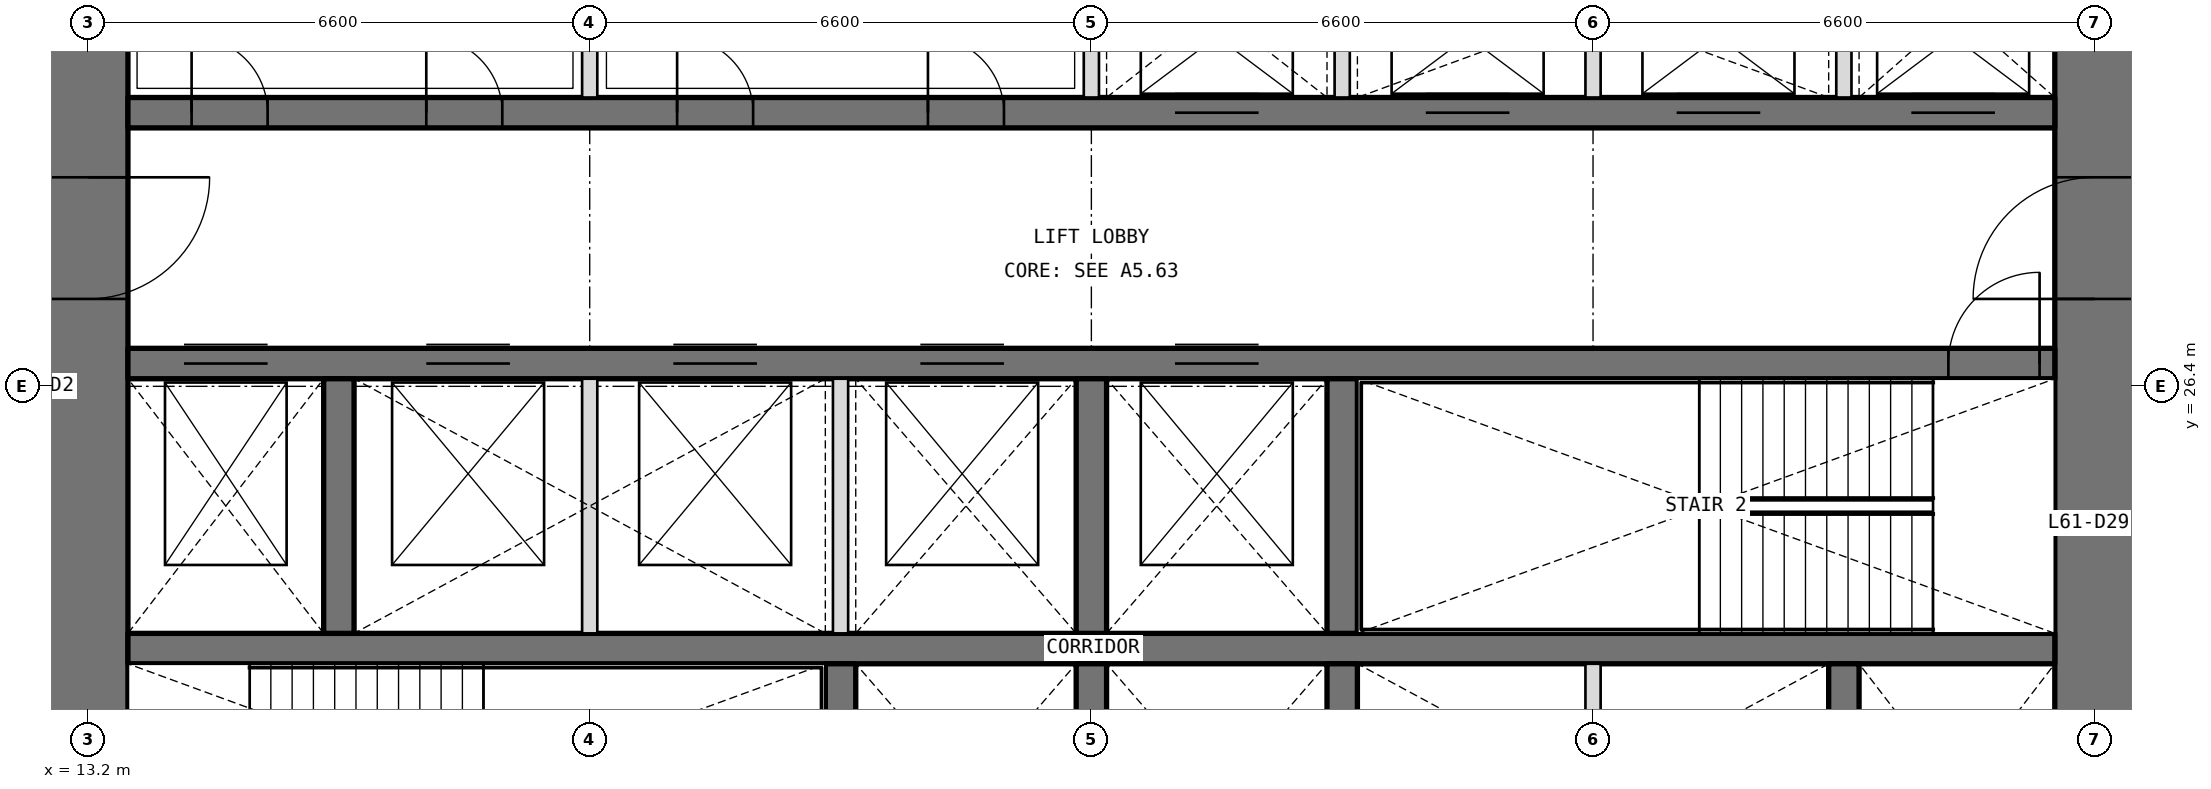
"""IFC4 building model, lengths in metres.
Left out: names, types, materials, properties, quantities, classifications, styles, units other than length and angle.
Written with IfcOpenShell. Run it as: python <this file> out.ifc"""

import sys

from ifc_helpers import new_model, si_unit, direction, frame, frame_2d, origin, place, context, subcontext, project, spatial, rectangle, extrude, element, fill, save


model = new_model("IFC4")
c1 = context("Model", 3, precision=1e-05, world=origin(), true_north=direction((0.0, 1.0)))
c2 = subcontext(c1, "Body", "Model", "MODEL_VIEW")
j1 = project(units=[si_unit("LENGTHUNIT", "METRE"), si_unit("PLANEANGLEUNIT", "RADIAN")], contexts=[c1])
p1 = place(None, origin())
s1 = spatial("IfcSite", under=j1, at=p1, CompositionType="ELEMENT")
p2 = place(p1, origin())
s2 = spatial("IfcBuilding", under=s1, at=p2, CompositionType="ELEMENT")
p3 = place(p2, frame((0.0, 0.0, 267.0)))
s3 = spatial("IfcBuildingStorey", under=s2, at=p3, CompositionType="ELEMENT", Elevation=267.0)
p4 = place(p3, frame((39.6, 13.725, 0.0), z_axis=(0.0, 0.0, 1.0), x_axis=(0.0, 1.0, 0.0)))
e1 = element("IfcWall", 1, at=p4, inside=s3, PredefinedType="SHEAR", context=c2, shape_type="SweptSolid", body=[
    extrude(rectangle(XDim=18.75, YDim=1.05, at=frame_2d((9.375, 0.0))), origin(), (0.0, 0.0, 1.0), 4.2),
])
p5 = place(p4, frame((3.025, 0.0, 0.0)))
e2 = element("IfcOpeningElement", 2, at=p5, cuts=e1, PredefinedType="OPENING", context=c2, shape_type="SweptSolid", body=[
    extrude(rectangle(XDim=1.6, YDim=2.1, at=frame_2d((0.8, 1.05))), frame((0.0, 0.535, 0.0), z_axis=(0.0, -1.0, 0.0), x_axis=(1.0, 0.0, 0.0)), (0.0, 0.0, 1.0), 1.07),
])
p6 = place(p4, frame((13.825, 0.0, 0.0)))
e3 = element("IfcOpeningElement", 3, at=p6, cuts=e1, PredefinedType="OPENING", context=c2, shape_type="SweptSolid", body=[
    extrude(rectangle(XDim=1.6, YDim=2.1, at=frame_2d((0.8, 1.05))), frame((0.0, 0.535, 0.0), z_axis=(0.0, -1.0, 0.0), x_axis=(1.0, 0.0, 0.0)), (0.0, 0.0, 1.0), 1.07),
])
p7 = place(p3, frame((13.2, 32.475, 0.0), z_axis=(0.0, 0.0, 1.0), x_axis=(0.0, -1.0, 0.0)))
e4 = element("IfcWall", 4, at=p7, inside=s3, PredefinedType="SHEAR", context=c2, shape_type="SweptSolid", body=[
    extrude(rectangle(XDim=18.75, YDim=1.05, at=frame_2d((9.375, 0.0))), origin(), (0.0, 0.0, 1.0), 4.2),
])
p8 = place(p7, frame((14.125, 0.0, 0.0)))
e5 = element("IfcOpeningElement", 5, at=p8, cuts=e4, PredefinedType="OPENING", context=c2, shape_type="SweptSolid", body=[
    extrude(rectangle(XDim=1.6, YDim=2.1, at=frame_2d((0.8, 1.05))), frame((0.0, 0.535, 0.0), z_axis=(0.0, -1.0, 0.0), x_axis=(1.0, 0.0, 0.0)), (0.0, 0.0, 1.0), 1.07),
])
p9 = place(p7, frame((3.325, 0.0, 0.0)))
e6 = element("IfcOpeningElement", 6, at=p9, cuts=e4, PredefinedType="OPENING", context=c2, shape_type="SweptSolid", body=[
    extrude(rectangle(XDim=1.6, YDim=2.1, at=frame_2d((0.8, 1.05))), frame((0.0, 0.535, 0.0), z_axis=(0.0, -1.0, 0.0), x_axis=(1.0, 0.0, 0.0)), (0.0, 0.0, 1.0), 1.07),
])
p10 = place(p3, frame((13.725, 22.95, 0.0), z_axis=(0.0, 0.0, 1.0), x_axis=(1.0, 0.0, 0.0)))
e7 = element("IfcWall", 7, at=p10, inside=s3, PredefinedType="SHEAR", context=c2, shape_type="SweptSolid", body=[
    extrude(rectangle(XDim=25.35, YDim=0.4, at=frame_2d((12.675, 0.0))), origin(), (0.0, 0.0, 1.0), 4.2),
])
p11 = place(p3, frame((13.725, 26.7, 0.0), z_axis=(0.0, 0.0, 1.0), x_axis=(1.0, 0.0, 0.0)))
e8 = element("IfcWall", 8, at=p11, inside=s3, PredefinedType="SHEAR", context=c2, shape_type="SweptSolid", body=[
    extrude(rectangle(XDim=25.35, YDim=0.4, at=frame_2d((12.675, 0.0))), origin(), (0.0, 0.0, 1.0), 4.2),
])
p12 = place(p11, frame((23.95, 0.0, 0.0)))
e9 = element("IfcOpeningElement", 9, at=p12, cuts=e8, PredefinedType="OPENING", context=c2, shape_type="SweptSolid", body=[
    extrude(rectangle(XDim=1.2, YDim=2.1, at=frame_2d((0.6, 1.05))), frame((0.0, 0.21, 0.0), z_axis=(0.0, -1.0, 0.0), x_axis=(1.0, 0.0, 0.0)), (0.0, 0.0, 1.0), 0.42),
])
p13 = place(p11, frame((0.738, 0.0, 0.0)))
e10 = element("IfcOpeningElement", 10, at=p13, cuts=e8, PredefinedType="OPENING", context=c2, shape_type="SweptSolid", body=[
    extrude(rectangle(XDim=1.1, YDim=2.1, at=frame_2d((0.55, 1.05))), frame((0.0, 0.21, 0.0), z_axis=(0.0, -1.0, 0.0), x_axis=(1.0, 0.0, 0.0)), (0.0, 0.0, 1.0), 0.42),
])
p14 = place(p11, frame((3.925, 0.0, 0.0)))
e11 = element("IfcOpeningElement", 11, at=p14, cuts=e8, PredefinedType="OPENING", context=c2, shape_type="SweptSolid", body=[
    extrude(rectangle(XDim=1.1, YDim=2.1, at=frame_2d((0.55, 1.05))), frame((0.0, 0.21, 0.0), z_axis=(0.0, -1.0, 0.0), x_axis=(1.0, 0.0, 0.0)), (0.0, 0.0, 1.0), 0.42),
])
p15 = place(p11, frame((7.175, 0.0, 0.0)))
e12 = element("IfcOpeningElement", 12, at=p15, cuts=e8, PredefinedType="OPENING", context=c2, shape_type="SweptSolid", body=[
    extrude(rectangle(XDim=1.1, YDim=2.1, at=frame_2d((0.55, 1.05))), frame((0.0, 0.21, 0.0), z_axis=(0.0, -1.0, 0.0), x_axis=(1.0, 0.0, 0.0)), (0.0, 0.0, 1.0), 0.42),
])
p16 = place(p11, frame((10.425, 0.0, 0.0)))
e13 = element("IfcOpeningElement", 13, at=p16, cuts=e8, PredefinedType="OPENING", context=c2, shape_type="SweptSolid", body=[
    extrude(rectangle(XDim=1.1, YDim=2.1, at=frame_2d((0.55, 1.05))), frame((0.0, 0.21, 0.0), z_axis=(0.0, -1.0, 0.0), x_axis=(1.0, 0.0, 0.0)), (0.0, 0.0, 1.0), 0.42),
])
p17 = place(p11, frame((13.775, 0.0, 0.0)))
e14 = element("IfcOpeningElement", 14, at=p17, cuts=e8, PredefinedType="OPENING", context=c2, shape_type="SweptSolid", body=[
    extrude(rectangle(XDim=1.1, YDim=2.1, at=frame_2d((0.55, 1.05))), frame((0.0, 0.21, 0.0), z_axis=(0.0, -1.0, 0.0), x_axis=(1.0, 0.0, 0.0)), (0.0, 0.0, 1.0), 0.42),
])
p18 = place(p3, frame((13.725, 30.0, 0.0), z_axis=(0.0, 0.0, 1.0), x_axis=(1.0, 0.0, 0.0)))
e15 = element("IfcWall", 15, at=p18, inside=s3, PredefinedType="SHEAR", context=c2, shape_type="SweptSolid", body=[
    extrude(rectangle(XDim=25.35, YDim=0.4, at=frame_2d((12.675, 0.0))), origin(), (0.0, 0.0, 1.0), 4.2),
])
p19 = place(p18, frame((0.837, 0.0, 0.0)))
e16 = element("IfcOpeningElement", 16, at=p19, cuts=e15, PredefinedType="OPENING", context=c2, shape_type="SweptSolid", body=[
    extrude(rectangle(XDim=1.0, YDim=2.1, at=frame_2d((0.5, 1.05))), frame((0.0, 0.21, 0.0), z_axis=(0.0, -1.0, 0.0), x_axis=(1.0, 0.0, 0.0)), (0.0, 0.0, 1.0), 0.42),
])
p20 = place(p18, frame((3.925, 0.0, 0.0)))
e17 = element("IfcOpeningElement", 17, at=p20, cuts=e15, PredefinedType="OPENING", context=c2, shape_type="SweptSolid", body=[
    extrude(rectangle(XDim=1.0, YDim=2.1, at=frame_2d((0.5, 1.05))), frame((0.0, 0.21, 0.0), z_axis=(0.0, -1.0, 0.0), x_axis=(1.0, 0.0, 0.0)), (0.0, 0.0, 1.0), 0.42),
])
p21 = place(p18, frame((7.225, 0.0, 0.0)))
e18 = element("IfcOpeningElement", 18, at=p21, cuts=e15, PredefinedType="OPENING", context=c2, shape_type="SweptSolid", body=[
    extrude(rectangle(XDim=1.0, YDim=2.1, at=frame_2d((0.5, 1.05))), frame((0.0, 0.21, 0.0), z_axis=(0.0, -1.0, 0.0), x_axis=(1.0, 0.0, 0.0)), (0.0, 0.0, 1.0), 0.42),
])
p22 = place(p18, frame((10.525, 0.0, 0.0)))
e19 = element("IfcOpeningElement", 19, at=p22, cuts=e15, PredefinedType="OPENING", context=c2, shape_type="SweptSolid", body=[
    extrude(rectangle(XDim=1.0, YDim=2.1, at=frame_2d((0.5, 1.05))), frame((0.0, 0.21, 0.0), z_axis=(0.0, -1.0, 0.0), x_axis=(1.0, 0.0, 0.0)), (0.0, 0.0, 1.0), 0.42),
])
p23 = place(p18, frame((13.775, 0.0, 0.0)))
e20 = element("IfcOpeningElement", 20, at=p23, cuts=e15, PredefinedType="OPENING", context=c2, shape_type="SweptSolid", body=[
    extrude(rectangle(XDim=1.1, YDim=2.1, at=frame_2d((0.55, 1.05))), frame((0.0, 0.21, 0.0), z_axis=(0.0, -1.0, 0.0), x_axis=(1.0, 0.0, 0.0)), (0.0, 0.0, 1.0), 0.42),
])
p24 = place(p18, frame((17.075, 0.0, 0.0)))
e21 = element("IfcOpeningElement", 21, at=p24, cuts=e15, PredefinedType="OPENING", context=c2, shape_type="SweptSolid", body=[
    extrude(rectangle(XDim=1.1, YDim=2.1, at=frame_2d((0.55, 1.05))), frame((0.0, 0.21, 0.0), z_axis=(0.0, -1.0, 0.0), x_axis=(1.0, 0.0, 0.0)), (0.0, 0.0, 1.0), 0.42),
])
p25 = place(p18, frame((20.375, 0.0, 0.0)))
e22 = element("IfcOpeningElement", 22, at=p25, cuts=e15, PredefinedType="OPENING", context=c2, shape_type="SweptSolid", body=[
    extrude(rectangle(XDim=1.1, YDim=2.1, at=frame_2d((0.55, 1.05))), frame((0.0, 0.21, 0.0), z_axis=(0.0, -1.0, 0.0), x_axis=(1.0, 0.0, 0.0)), (0.0, 0.0, 1.0), 0.42),
])
p26 = place(p18, frame((23.462, 0.0, 0.0)))
e23 = element("IfcOpeningElement", 23, at=p26, cuts=e15, PredefinedType="OPENING", context=c2, shape_type="SweptSolid", body=[
    extrude(rectangle(XDim=1.1, YDim=2.1, at=frame_2d((0.55, 1.05))), frame((0.0, 0.21, 0.0), z_axis=(0.0, -1.0, 0.0), x_axis=(1.0, 0.0, 0.0)), (0.0, 0.0, 1.0), 0.42),
])
for number, where, z_axis, x_axis in (
    (24, (23.1, 19.4, 0.0), (0.0, 0.0, 1.0), (0.0, 1.0, 0.0)),
    (25, (26.4, 19.4, 0.0), (0.0, 0.0, 1.0), (0.0, 1.0, 0.0)),
    (26, (29.7, 19.4, 0.0), (0.0, 0.0, 1.0), (0.0, 1.0, 0.0)),
    (27, (36.3, 19.4, 0.0), (0.0, 0.0, 1.0), (0.0, 1.0, 0.0)),
    (28, (16.5, 23.15, 0.0), (0.0, 0.0, 1.0), (0.0, 1.0, 0.0)),
    (29, (26.4, 23.15, 0.0), (0.0, 0.0, 1.0), (0.0, 1.0, 0.0)),
    (30, (29.7, 23.15, 0.0), (0.0, 0.0, 1.0), (0.0, 1.0, 0.0)),
):
    element("IfcWall", number, at=place(p3, frame(where, z_axis=z_axis, x_axis=x_axis)), inside=s3, PredefinedType="SHEAR", context=c2, shape_type="SweptSolid", body=[
        extrude(rectangle(XDim=3.35, YDim=0.4, at=frame_2d((1.675, 0.0))), origin(), (0.0, 0.0, 1.0), 4.2),
    ])
for number, where, z_axis, x_axis in (
    (31, (19.8, 30.2, 0.0), (0.0, 0.0, 1.0), (0.0, 1.0, 0.0)),
    (32, (26.4, 30.2, 0.0), (0.0, 0.0, 1.0), (0.0, 1.0, 0.0)),
    (33, (29.7, 30.2, 0.0), (0.0, 0.0, 1.0), (0.0, 1.0, 0.0)),
    (34, (33.0, 30.2, 0.0), (0.0, 0.0, 1.0), (0.0, 1.0, 0.0)),
    (35, (36.3, 30.2, 0.0), (0.0, 0.0, 1.0), (0.0, 1.0, 0.0)),
):
    element("IfcWall", number, at=place(p3, frame(where, z_axis=z_axis, x_axis=x_axis)), inside=s3, PredefinedType="PARTITIONING", context=c2, shape_type="SweptSolid", body=[
        extrude(rectangle(XDim=2.275, YDim=0.2, at=frame_2d((1.138, 0.0))), origin(), (0.0, 0.0, 1.0), 4.2),
    ])
for number, where, z_axis, x_axis in (
    (36, (33.0, 19.4, 0.0), (0.0, 0.0, 1.0), (0.0, 1.0, 0.0)),
    (37, (19.8, 23.15, 0.0), (0.0, 0.0, 1.0), (0.0, 1.0, 0.0)),
    (38, (23.1, 23.15, 0.0), (0.0, 0.0, 1.0), (0.0, 1.0, 0.0)),
):
    element("IfcWall", number, at=place(p3, frame(where, z_axis=z_axis, x_axis=x_axis)), inside=s3, PredefinedType="PARTITIONING", context=c2, shape_type="SweptSolid", body=[
        extrude(rectangle(XDim=3.35, YDim=0.2, at=frame_2d((1.675, 0.0))), origin(), (0.0, 0.0, 1.0), 4.2),
    ])
p27 = place(p19, origin())
e39 = element("IfcDoor", 39, at=p27, inside=s3, OperationType="SINGLE_SWING_LEFT", PredefinedType="DOOR", context=c2, shape_type="SweptSolid", body=[
    extrude(rectangle(XDim=1.0, YDim=2.1, at=frame_2d((0.5, 1.05))), frame((0.0, 0.025, 0.0), z_axis=(0.0, -1.0, 0.0), x_axis=(1.0, 0.0, 0.0)), (0.0, 0.0, 1.0), 0.05),
])
fill(e16, e39)
p28 = place(p20, origin())
e40 = element("IfcDoor", 40, at=p28, inside=s3, OperationType="SINGLE_SWING_LEFT", PredefinedType="DOOR", context=c2, shape_type="SweptSolid", body=[
    extrude(rectangle(XDim=1.0, YDim=2.1, at=frame_2d((0.5, 1.05))), frame((0.0, 0.025, 0.0), z_axis=(0.0, -1.0, 0.0), x_axis=(1.0, 0.0, 0.0)), (0.0, 0.0, 1.0), 0.05),
])
fill(e17, e40)
p29 = place(p21, origin())
e41 = element("IfcDoor", 41, at=p29, inside=s3, OperationType="SINGLE_SWING_LEFT", PredefinedType="DOOR", context=c2, shape_type="SweptSolid", body=[
    extrude(rectangle(XDim=1.0, YDim=2.1, at=frame_2d((0.5, 1.05))), frame((0.0, 0.025, 0.0), z_axis=(0.0, -1.0, 0.0), x_axis=(1.0, 0.0, 0.0)), (0.0, 0.0, 1.0), 0.05),
])
fill(e18, e41)
p30 = place(p22, origin())
e42 = element("IfcDoor", 42, at=p30, inside=s3, OperationType="SINGLE_SWING_LEFT", PredefinedType="DOOR", context=c2, shape_type="SweptSolid", body=[
    extrude(rectangle(XDim=1.0, YDim=2.1, at=frame_2d((0.5, 1.05))), frame((0.0, 0.025, 0.0), z_axis=(0.0, -1.0, 0.0), x_axis=(1.0, 0.0, 0.0)), (0.0, 0.0, 1.0), 0.05),
])
fill(e19, e42)
p31 = place(p12, origin())
e43 = element("IfcDoor", 43, at=p31, inside=s3, OperationType="SINGLE_SWING_RIGHT", PredefinedType="DOOR", context=c2, shape_type="SweptSolid", body=[
    extrude(rectangle(XDim=1.2, YDim=2.1, at=frame_2d((0.6, 1.05))), frame((0.0, 0.025, 0.0), z_axis=(0.0, -1.0, 0.0), x_axis=(1.0, 0.0, 0.0)), (0.0, 0.0, 1.0), 0.05),
])
fill(e9, e43)
p32 = place(p9, origin())
e44 = element("IfcDoor", 44, at=p32, inside=s3, OperationType="DOUBLE_DOOR_DOUBLE_SWING", PredefinedType="DOOR", context=c2, shape_type="SweptSolid", body=[
    extrude(rectangle(XDim=1.6, YDim=2.1, at=frame_2d((0.8, 1.05))), frame((0.0, 0.025, 0.0), z_axis=(0.0, -1.0, 0.0), x_axis=(1.0, 0.0, 0.0)), (0.0, 0.0, 1.0), 0.05),
])
fill(e6, e44)
p33 = place(p6, origin())
e45 = element("IfcDoor", 45, at=p33, inside=s3, OperationType="DOUBLE_DOOR_DOUBLE_SWING", PredefinedType="DOOR", context=c2, shape_type="SweptSolid", body=[
    extrude(rectangle(XDim=1.6, YDim=2.1, at=frame_2d((0.8, 1.05))), frame((0.0, 0.025, 0.0), z_axis=(0.0, -1.0, 0.0), x_axis=(1.0, 0.0, 0.0)), (0.0, 0.0, 1.0), 0.05),
])
fill(e3, e45)
p34 = place(p23, origin())
e46 = element("IfcDoor", 46, at=p34, inside=s3, OperationType="DOUBLE_DOOR_SLIDING", PredefinedType="DOOR", context=c2, shape_type="SweptSolid", body=[
    extrude(rectangle(XDim=1.1, YDim=2.1, at=frame_2d((0.55, 1.05))), frame((0.0, 0.025, 0.0), z_axis=(0.0, -1.0, 0.0), x_axis=(1.0, 0.0, 0.0)), (0.0, 0.0, 1.0), 0.05),
])
fill(e20, e46)
p35 = place(p24, origin())
e47 = element("IfcDoor", 47, at=p35, inside=s3, OperationType="DOUBLE_DOOR_SLIDING", PredefinedType="DOOR", context=c2, shape_type="SweptSolid", body=[
    extrude(rectangle(XDim=1.1, YDim=2.1, at=frame_2d((0.55, 1.05))), frame((0.0, 0.025, 0.0), z_axis=(0.0, -1.0, 0.0), x_axis=(1.0, 0.0, 0.0)), (0.0, 0.0, 1.0), 0.05),
])
fill(e21, e47)
p36 = place(p25, origin())
e48 = element("IfcDoor", 48, at=p36, inside=s3, OperationType="DOUBLE_DOOR_SLIDING", PredefinedType="DOOR", context=c2, shape_type="SweptSolid", body=[
    extrude(rectangle(XDim=1.1, YDim=2.1, at=frame_2d((0.55, 1.05))), frame((0.0, 0.025, 0.0), z_axis=(0.0, -1.0, 0.0), x_axis=(1.0, 0.0, 0.0)), (0.0, 0.0, 1.0), 0.05),
])
fill(e22, e48)
p37 = place(p26, origin())
e49 = element("IfcDoor", 49, at=p37, inside=s3, OperationType="DOUBLE_DOOR_SLIDING", PredefinedType="DOOR", context=c2, shape_type="SweptSolid", body=[
    extrude(rectangle(XDim=1.1, YDim=2.1, at=frame_2d((0.55, 1.05))), frame((0.0, 0.025, 0.0), z_axis=(0.0, -1.0, 0.0), x_axis=(1.0, 0.0, 0.0)), (0.0, 0.0, 1.0), 0.05),
])
fill(e23, e49)
p38 = place(p13, origin())
e50 = element("IfcDoor", 50, at=p38, inside=s3, OperationType="DOUBLE_DOOR_SLIDING", PredefinedType="DOOR", context=c2, shape_type="SweptSolid", body=[
    extrude(rectangle(XDim=1.1, YDim=2.1, at=frame_2d((0.55, 1.05))), frame((0.0, 0.025, 0.0), z_axis=(0.0, -1.0, 0.0), x_axis=(1.0, 0.0, 0.0)), (0.0, 0.0, 1.0), 0.05),
])
fill(e10, e50)
p39 = place(p14, origin())
e51 = element("IfcDoor", 51, at=p39, inside=s3, OperationType="DOUBLE_DOOR_SLIDING", PredefinedType="DOOR", context=c2, shape_type="SweptSolid", body=[
    extrude(rectangle(XDim=1.1, YDim=2.1, at=frame_2d((0.55, 1.05))), frame((0.0, 0.025, 0.0), z_axis=(0.0, -1.0, 0.0), x_axis=(1.0, 0.0, 0.0)), (0.0, 0.0, 1.0), 0.05),
])
fill(e11, e51)
p40 = place(p15, origin())
e52 = element("IfcDoor", 52, at=p40, inside=s3, OperationType="DOUBLE_DOOR_SLIDING", PredefinedType="DOOR", context=c2, shape_type="SweptSolid", body=[
    extrude(rectangle(XDim=1.1, YDim=2.1, at=frame_2d((0.55, 1.05))), frame((0.0, 0.025, 0.0), z_axis=(0.0, -1.0, 0.0), x_axis=(1.0, 0.0, 0.0)), (0.0, 0.0, 1.0), 0.05),
])
fill(e12, e52)
p41 = place(p16, origin())
e53 = element("IfcDoor", 53, at=p41, inside=s3, OperationType="DOUBLE_DOOR_SLIDING", PredefinedType="DOOR", context=c2, shape_type="SweptSolid", body=[
    extrude(rectangle(XDim=1.1, YDim=2.1, at=frame_2d((0.55, 1.05))), frame((0.0, 0.025, 0.0), z_axis=(0.0, -1.0, 0.0), x_axis=(1.0, 0.0, 0.0)), (0.0, 0.0, 1.0), 0.05),
])
fill(e13, e53)
p42 = place(p17, origin())
e54 = element("IfcDoor", 54, at=p42, inside=s3, OperationType="DOUBLE_DOOR_SLIDING", PredefinedType="DOOR", context=c2, shape_type="SweptSolid", body=[
    extrude(rectangle(XDim=1.1, YDim=2.1, at=frame_2d((0.55, 1.05))), frame((0.0, 0.025, 0.0), z_axis=(0.0, -1.0, 0.0), x_axis=(1.0, 0.0, 0.0)), (0.0, 0.0, 1.0), 0.05),
])
fill(e14, e54)
save(model, sys.argv[1])
